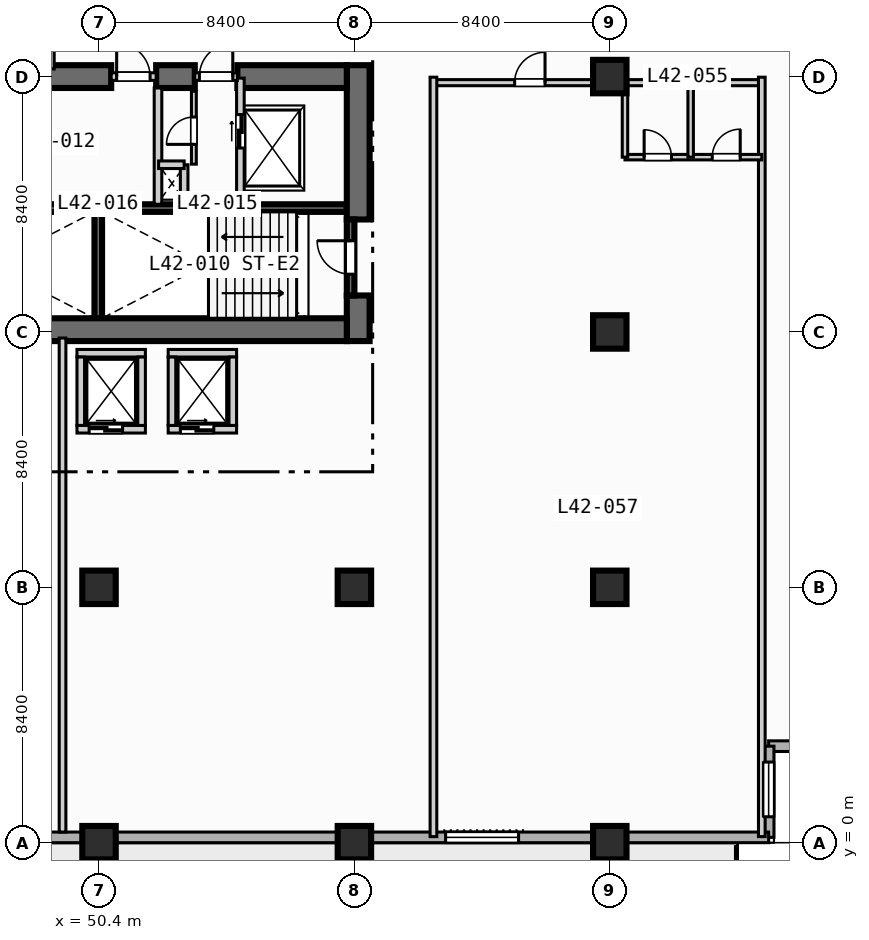
"""IFC4 building model, lengths in metres.
Left out: names, types, materials, properties, quantities, classifications, styles, units other than length and angle.
Written with IfcOpenShell. Run it as: python <this file> out.ifc"""

import sys

from ifc_helpers import new_model, si_unit, direction, frame, frame_2d, origin, origin_2d, place, context, subcontext, project, spatial, rectangle, extrude, element, fill, save


model = new_model("IFC4")
c1 = context("Model", 3, precision=1e-05, world=origin(), true_north=direction((0.0, 1.0)))
c2 = subcontext(c1, "Body", "Model", "MODEL_VIEW")
j1 = project(units=[si_unit("LENGTHUNIT", "METRE"), si_unit("PLANEANGLEUNIT", "RADIAN")], contexts=[c1])
p1 = place(None, origin())
s1 = spatial("IfcSite", under=j1, at=p1, CompositionType="ELEMENT")
p2 = place(p1, origin())
s2 = spatial("IfcBuilding", under=s1, at=p2, CompositionType="ELEMENT")
p3 = place(p2, frame((0.0, 0.0, 175.4)))
s3 = spatial("IfcBuildingStorey", under=s2, at=p3, CompositionType="ELEMENT", Elevation=175.4)
for number, where, z_axis, x_axis in (
    (1, (42.2, 20.875, 0.0), (0.0, 0.0, 1.0), (1.0, 0.0, 0.0)),
    (2, (50.5, 20.875, 0.0), (0.0, 0.0, 1.0), (1.0, 0.0, 0.0)),
):
    element("IfcWall", number, at=place(p3, frame(where, z_axis=z_axis, x_axis=x_axis)), inside=s3, PredefinedType="SOLIDWALL", context=c2, shape_type="SweptSolid", body=[
        extrude(rectangle(XDim=8.05, YDim=0.25, at=frame_2d((4.025, 0.0))), origin(), (0.0, 0.0, 1.0), 3.47),
    ])
p4 = place(p3, frame((50.375, 17.25, 0.0), z_axis=(0.0, 0.0, 1.0), x_axis=(0.0, 1.0, 0.0)))
e3 = element("IfcWall", 3, at=p4, inside=s3, PredefinedType="SOLIDWALL", context=c2, shape_type="SweptSolid", body=[
    extrude(rectangle(XDim=3.5, YDim=0.25, at=frame_2d((1.75, 0.0))), origin(), (0.0, 0.0, 1.0), 3.47),
])
p5 = place(p3, frame((58.925, 16.5, 0.0), z_axis=(0.0, 0.0, 1.0), x_axis=(0.0, 1.0, 0.0)))
e4 = element("IfcWall", 4, at=p5, inside=s3, PredefinedType="SHEAR", context=c2, shape_type="SweptSolid", body=[
    extrude(rectangle(XDim=1.5, YDim=0.75, at=frame_2d((0.75, 0.0))), origin(), (0.0, 0.0, 1.0), 3.47),
])
p6 = place(p3, frame((58.925, 20.5, 0.0), z_axis=(0.0, 0.0, 1.0), x_axis=(0.0, 1.0, 0.0)))
e5 = element("IfcWall", 5, at=p6, inside=s3, PredefinedType="SHEAR", context=c2, shape_type="SweptSolid", body=[
    extrude(rectangle(XDim=5.075, YDim=0.75, at=frame_2d((2.538, 0.0))), origin(), (0.0, 0.0, 1.0), 3.47),
])
p7 = place(p3, frame((42.2, 16.875, 0.0), z_axis=(0.0, 0.0, 1.0), x_axis=(1.0, 0.0, 0.0)))
e6 = element("IfcWall", 6, at=p7, inside=s3, PredefinedType="SHEAR", context=c2, shape_type="SweptSolid", body=[
    extrude(rectangle(XDim=16.35, YDim=0.75, at=frame_2d((8.175, 0.0))), origin(), (0.0, 0.0, 1.0), 3.47),
])
p8 = place(p3, frame((42.2, 25.2, 0.0), z_axis=(0.0, 0.0, 1.0), x_axis=(1.0, 0.0, 0.0)))
e7 = element("IfcWall", 7, at=p8, inside=s3, PredefinedType="SHEAR", context=c2, shape_type="SweptSolid", body=[
    extrude(rectangle(XDim=8.6, YDim=0.75, at=frame_2d((4.3, 0.0))), origin(), (0.0, 0.0, 1.0), 3.47),
])
p9 = place(p3, frame((52.28, 25.2, 0.0), z_axis=(0.0, 0.0, 1.0), x_axis=(1.0, 0.0, 0.0)))
e8 = element("IfcWall", 8, at=p9, inside=s3, PredefinedType="SHEAR", context=c2, shape_type="SweptSolid", body=[
    extrude(rectangle(XDim=1.27, YDim=0.75, at=frame_2d((0.635, 0.0))), origin(), (0.0, 0.0, 1.0), 3.47),
])
p10 = place(p3, frame((54.95, 25.2, 0.0), z_axis=(0.0, 0.0, 1.0), x_axis=(1.0, 0.0, 0.0)))
e9 = element("IfcWall", 9, at=p10, inside=s3, PredefinedType="SHEAR", context=c2, shape_type="SweptSolid", body=[
    extrude(rectangle(XDim=3.6, YDim=0.75, at=frame_2d((1.8, 0.0))), origin(), (0.0, 0.0, 1.0), 3.47),
])
for number, where, z_axis, x_axis in (
    (10, (50.4, 0.0, 0.0), (0.0, 0.0, 1.0), (1.0, 0.0, 0.0)),
    (11, (50.4, 8.4, 0.0), (0.0, 0.0, 1.0), (1.0, 0.0, 0.0)),
    (12, (58.8, 0.0, 0.0), (0.0, 0.0, 1.0), (1.0, 0.0, 0.0)),
    (13, (58.8, 8.4, 0.0), (0.0, 0.0, 1.0), (1.0, 0.0, 0.0)),
    (14, (67.2, 0.0, 0.0), (0.0, 0.0, 1.0), (1.0, 0.0, 0.0)),
    (15, (67.2, 8.4, 0.0), (0.0, 0.0, 1.0), (1.0, 0.0, 0.0)),
    (16, (67.2, 16.8, 0.0), (0.0, 0.0, 1.0), (1.0, 0.0, 0.0)),
    (17, (67.2, 25.2, 0.0), (0.0, 0.0, 1.0), (1.0, 0.0, 0.0)),
):
    element("IfcColumn", number, at=place(p3, frame(where, z_axis=z_axis, x_axis=x_axis)), inside=s3, PredefinedType="COLUMN", context=c2, shape_type="SweptSolid", body=[
        extrude(rectangle(XDim=1.1, YDim=1.1, at=origin_2d()), origin(), (0.0, 0.0, 1.0), 3.7),
    ])
p11 = place(p3, frame((75.425, 3.175, 0.0), z_axis=(0.0, 0.0, 1.0), x_axis=(-1.0, 0.0, 0.0)))
e18 = element("IfcWall", 18, at=p11, inside=s3, PredefinedType="STANDARD", context=c2, shape_type="SweptSolid", body=[
    extrude(rectangle(XDim=3.0, YDim=0.35, at=frame_2d((1.5, 0.0))), origin(), (0.0, 0.0, 1.0), 3.47),
])
p12 = place(p3, frame((72.425, 3.175, 0.0), z_axis=(0.0, 0.0, 1.0), x_axis=(0.0, -1.0, 0.0)))
e19 = element("IfcWall", 19, at=p12, inside=s3, PredefinedType="STANDARD", context=c2, shape_type="SweptSolid", body=[
    extrude(rectangle(XDim=3.0, YDim=0.35, at=frame_2d((1.5, 0.0))), origin(), (0.0, 0.0, 1.0), 3.47),
])
p13 = place(p12, frame((0.522, 0.0, 0.85)))
e20 = element("IfcOpeningElement", 20, at=p13, cuts=e19, PredefinedType="OPENING", context=c2, shape_type="SweptSolid", body=[
    extrude(rectangle(XDim=1.8, YDim=1.8, at=frame_2d((0.9, 0.9))), frame((0.0, 0.185, 0.0), z_axis=(0.0, -1.0, 0.0), x_axis=(1.0, 0.0, 0.0)), (0.0, 0.0, 1.0), 0.37),
])
p14 = place(p3, frame((72.425, 0.175, 0.0), z_axis=(0.0, 0.0, 1.0), x_axis=(-1.0, 0.0, 0.0)))
e21 = element("IfcWall", 21, at=p14, inside=s3, PredefinedType="STANDARD", context=c2, shape_type="SweptSolid", body=[
    extrude(rectangle(XDim=69.25, YDim=0.35, at=frame_2d((34.625, 0.0))), origin(), (0.0, 0.0, 1.0), 3.47),
])
p15 = place(p14, frame((51.725, 0.0, 0.0)))
e22 = element("IfcOpeningElement", 22, at=p15, cuts=e21, PredefinedType="OPENING", context=c2, shape_type="SweptSolid", body=[
    extrude(rectangle(XDim=1.4, YDim=2.2, at=frame_2d((0.7, 1.1))), frame((0.0, 0.185, 0.0), z_axis=(0.0, -1.0, 0.0), x_axis=(1.0, 0.0, 0.0)), (0.0, 0.0, 1.0), 0.37),
])
p16 = place(p14, frame((33.725, 0.0, 0.85)))
e23 = element("IfcOpeningElement", 23, at=p16, cuts=e21, PredefinedType="OPENING", context=c2, shape_type="SweptSolid", body=[
    extrude(rectangle(XDim=1.8, YDim=1.8, at=frame_2d((0.9, 0.9))), frame((0.0, 0.185, 0.0), z_axis=(0.0, -1.0, 0.0), x_axis=(1.0, 0.0, 0.0)), (0.0, 0.0, 1.0), 0.37),
])
p17 = place(p14, frame((25.025, 0.0, 0.85)))
e24 = element("IfcOpeningElement", 24, at=p17, cuts=e21, PredefinedType="OPENING", context=c2, shape_type="SweptSolid", body=[
    extrude(rectangle(XDim=2.4, YDim=1.95, at=frame_2d((1.2, 0.975))), frame((0.0, 0.185, 0.0), z_axis=(0.0, -1.0, 0.0), x_axis=(1.0, 0.0, 0.0)), (0.0, 0.0, 1.0), 0.37),
])
p18 = place(p14, frame((8.225, 0.0, 0.85)))
e25 = element("IfcOpeningElement", 25, at=p18, cuts=e21, PredefinedType="OPENING", context=c2, shape_type="SweptSolid", body=[
    extrude(rectangle(XDim=2.4, YDim=1.95, at=frame_2d((1.2, 0.975))), frame((0.0, 0.185, 0.0), z_axis=(0.0, -1.0, 0.0), x_axis=(1.0, 0.0, 0.0)), (0.0, 0.0, 1.0), 0.37),
])
p19 = place(p14, frame((64.725, 0.0, 0.85)))
e26 = element("IfcOpeningElement", 26, at=p19, cuts=e21, PredefinedType="OPENING", context=c2, shape_type="SweptSolid", body=[
    extrude(rectangle(XDim=1.8, YDim=1.8, at=frame_2d((0.9, 0.9))), frame((0.0, 0.185, 0.0), z_axis=(0.0, -1.0, 0.0), x_axis=(1.0, 0.0, 0.0)), (0.0, 0.0, 1.0), 0.37),
])
p20 = place(p14, frame((44.675, 0.0, 0.85)))
e27 = element("IfcOpeningElement", 27, at=p20, cuts=e21, PredefinedType="OPENING", context=c2, shape_type="SweptSolid", body=[
    extrude(rectangle(XDim=1.8, YDim=1.8, at=frame_2d((0.9, 0.9))), frame((0.0, 0.185, 0.0), z_axis=(0.0, -1.0, 0.0), x_axis=(1.0, 0.0, 0.0)), (0.0, 0.0, 1.0), 0.37),
])
p21 = place(p3, frame((58.675, 18.0, 0.0), z_axis=(0.0, 0.0, 1.0), x_axis=(0.0, 1.0, 0.0)))
e28 = element("IfcWall", 28, at=p21, inside=s3, PredefinedType="SOLIDWALL", context=c2, shape_type="SweptSolid", body=[
    extrude(rectangle(XDim=2.5, YDim=0.25, at=frame_2d((1.25, 0.0))), origin(), (0.0, 0.0, 1.0), 3.47),
])
p22 = place(p21, frame((0.7, 0.0, 0.0)))
e29 = element("IfcOpeningElement", 29, at=p22, cuts=e28, PredefinedType="OPENING", context=c2, shape_type="SweptSolid", body=[
    extrude(rectangle(XDim=1.1, YDim=2.15, at=frame_2d((0.55, 1.075))), frame((0.0, 0.135, 0.0), z_axis=(0.0, -1.0, 0.0), x_axis=(1.0, 0.0, 0.0)), (0.0, 0.0, 1.0), 0.27),
])
p23 = place(p3, frame((50.8, 25.2, 0.0), z_axis=(0.0, 0.0, 1.0), x_axis=(1.0, 0.0, 0.0)))
e30 = element("IfcWall", 30, at=p23, inside=s3, PredefinedType="SOLIDWALL", context=c2, shape_type="SweptSolid", body=[
    extrude(rectangle(XDim=1.48, YDim=0.25, at=frame_2d((0.74, 0.0))), origin(), (0.0, 0.0, 1.0), 3.47),
])
p24 = place(p23, frame((0.18, 0.0, 0.0)))
e31 = element("IfcOpeningElement", 31, at=p24, cuts=e30, PredefinedType="OPENING", context=c2, shape_type="SweptSolid", body=[
    extrude(rectangle(XDim=1.1, YDim=2.15, at=frame_2d((0.55, 1.075))), frame((0.0, 0.135, 0.0), z_axis=(0.0, -1.0, 0.0), x_axis=(1.0, 0.0, 0.0)), (0.0, 0.0, 1.0), 0.27),
])
p25 = place(p3, frame((52.34, 21.0, 0.0), z_axis=(0.0, 0.0, 1.0), x_axis=(0.0, 1.0, 0.0)))
e32 = element("IfcWall", 32, at=p25, inside=s3, PredefinedType="SOLIDWALL", context=c2, shape_type="SweptSolid", body=[
    extrude(rectangle(XDim=3.825, YDim=0.25, at=frame_2d((1.913, 0.0))), origin(), (0.0, 0.0, 1.0), 3.47),
])
p26 = place(p3, frame((55.05, 21.0, 0.0), z_axis=(0.0, 0.0, 1.0), x_axis=(0.0, 1.0, 0.0)))
e33 = element("IfcWall", 33, at=p26, inside=s3, PredefinedType="SOLIDWALL", context=c2, shape_type="SweptSolid", body=[
    extrude(rectangle(XDim=4.15, YDim=0.25, at=frame_2d((2.075, 0.0))), origin(), (0.0, 0.0, 1.0), 3.47),
])
p27 = place(p26, frame((1.85, 0.0, 0.0)))
e34 = element("IfcOpeningElement", 34, at=p27, cuts=e33, PredefinedType="OPENING", context=c2, shape_type="SweptSolid", body=[
    extrude(rectangle(XDim=1.1, YDim=2.15, at=frame_2d((0.55, 1.075))), frame((0.0, 0.135, 0.0), z_axis=(0.0, -1.0, 0.0), x_axis=(1.0, 0.0, 0.0)), (0.0, 0.0, 1.0), 0.27),
])
p28 = place(p3, frame((53.55, 25.2, 0.0), z_axis=(0.0, 0.0, 1.0), x_axis=(1.0, 0.0, 0.0)))
e35 = element("IfcWall", 35, at=p28, inside=s3, PredefinedType="SOLIDWALL", context=c2, shape_type="SweptSolid", body=[
    extrude(rectangle(XDim=1.4, YDim=0.25, at=frame_2d((0.7, 0.0))), origin(), (0.0, 0.0, 1.0), 3.47),
])
p29 = place(p28, frame((0.15, 0.0, 0.0)))
e36 = element("IfcOpeningElement", 36, at=p29, cuts=e35, PredefinedType="OPENING", context=c2, shape_type="SweptSolid", body=[
    extrude(rectangle(XDim=1.1, YDim=2.15, at=frame_2d((0.55, 1.075))), frame((0.0, 0.135, 0.0), z_axis=(0.0, -1.0, 0.0), x_axis=(1.0, 0.0, 0.0)), (0.0, 0.0, 1.0), 0.27),
])
p30 = place(p3, frame((53.2, 21.0, 0.0), z_axis=(0.0, 0.0, 1.0), x_axis=(0.0, 1.0, 0.0)))
e37 = element("IfcWall", 37, at=p30, inside=s3, PredefinedType="SOLIDWALL", context=c2, shape_type="SweptSolid", body=[
    extrude(rectangle(XDim=1.3, YDim=0.25, at=frame_2d((0.65, 0.0))), origin(), (0.0, 0.0, 1.0), 3.47),
])
p31 = place(p3, frame((52.36, 22.3, 0.0), z_axis=(0.0, 0.0, 1.0), x_axis=(1.0, 0.0, 0.0)))
e38 = element("IfcWall", 38, at=p31, inside=s3, PredefinedType="SOLIDWALL", context=c2, shape_type="SweptSolid", body=[
    extrude(rectangle(XDim=0.84, YDim=0.25, at=frame_2d((0.42, 0.0))), origin(), (0.0, 0.0, 1.0), 3.47),
])
p32 = place(p3, frame((53.52, 22.32, 0.0), z_axis=(0.0, 0.0, 1.0), x_axis=(0.0, 1.0, 0.0)))
e39 = element("IfcWall", 39, at=p32, inside=s3, PredefinedType="PARTITIONING", context=c2, shape_type="SweptSolid", body=[
    extrude(rectangle(XDim=2.4, YDim=0.16, at=frame_2d((1.2, 0.0))), origin(), (0.0, 0.0, 1.0), 3.47),
])
p33 = place(p32, frame((0.65, 0.0, 0.0)))
e40 = element("IfcOpeningElement", 40, at=p33, cuts=e39, PredefinedType="OPENING", context=c2, shape_type="SweptSolid", body=[
    extrude(rectangle(XDim=0.9, YDim=2.1, at=frame_2d((0.45, 1.05))), frame((0.0, 0.09, 0.0), z_axis=(0.0, -1.0, 0.0), x_axis=(1.0, 0.0, 0.0)), (0.0, 0.0, 1.0), 0.18),
])
p34 = place(p3, frame((49.675, 13.6, 0.0), z_axis=(0.0, 0.0, 1.0), x_axis=(1.0, 0.0, 0.0)))
e41 = element("IfcWall", 41, at=p34, inside=s3, PredefinedType="SOLIDWALL", context=c2, shape_type="SweptSolid", body=[
    extrude(rectangle(XDim=2.25, YDim=0.25, at=frame_2d((1.125, 0.0))), origin(), (0.0, 0.0, 1.0), 3.47),
])
p35 = place(p34, frame((0.4, 0.0, 0.0)))
e42 = element("IfcOpeningElement", 42, at=p35, cuts=e41, PredefinedType="OPENING", context=c2, shape_type="SweptSolid", body=[
    extrude(rectangle(XDim=1.1, YDim=2.15, at=frame_2d((0.55, 1.075))), frame((0.0, 0.135, 0.0), z_axis=(0.0, -1.0, 0.0), x_axis=(1.0, 0.0, 0.0)), (0.0, 0.0, 1.0), 0.27),
])
for number, where, z_axis, x_axis in (
    (43, (49.675, 16.1, 0.0), (0.0, 0.0, 1.0), (1.0, 0.0, 0.0)),
    (44, (49.8, 13.725, 0.0), (0.0, 0.0, 1.0), (0.0, 1.0, 0.0)),
    (45, (51.8, 13.725, 0.0), (0.0, 0.0, 1.0), (0.0, 1.0, 0.0)),
):
    element("IfcWall", number, at=place(p3, frame(where, z_axis=z_axis, x_axis=x_axis)), inside=s3, PredefinedType="SOLIDWALL", context=c2, shape_type="SweptSolid", body=[
        extrude(rectangle(XDim=2.25, YDim=0.25, at=frame_2d((1.125, 0.0))), origin(), (0.0, 0.0, 1.0), 3.47),
    ])
p36 = place(p3, frame((52.675, 13.6, 0.0), z_axis=(0.0, 0.0, 1.0), x_axis=(1.0, 0.0, 0.0)))
e46 = element("IfcWall", 46, at=p36, inside=s3, PredefinedType="SOLIDWALL", context=c2, shape_type="SweptSolid", body=[
    extrude(rectangle(XDim=2.25, YDim=0.25, at=frame_2d((1.125, 0.0))), origin(), (0.0, 0.0, 1.0), 3.47),
])
p37 = place(p36, frame((0.4, 0.0, 0.0)))
e47 = element("IfcOpeningElement", 47, at=p37, cuts=e46, PredefinedType="OPENING", context=c2, shape_type="SweptSolid", body=[
    extrude(rectangle(XDim=1.1, YDim=2.15, at=frame_2d((0.55, 1.075))), frame((0.0, 0.135, 0.0), z_axis=(0.0, -1.0, 0.0), x_axis=(1.0, 0.0, 0.0)), (0.0, 0.0, 1.0), 0.27),
])
for number, where, z_axis, x_axis in (
    (48, (52.675, 16.1, 0.0), (0.0, 0.0, 1.0), (1.0, 0.0, 0.0)),
    (49, (52.8, 13.725, 0.0), (0.0, 0.0, 1.0), (0.0, 1.0, 0.0)),
    (50, (54.8, 13.725, 0.0), (0.0, 0.0, 1.0), (0.0, 1.0, 0.0)),
):
    element("IfcWall", number, at=place(p3, frame(where, z_axis=z_axis, x_axis=x_axis)), inside=s3, PredefinedType="SOLIDWALL", context=c2, shape_type="SweptSolid", body=[
        extrude(rectangle(XDim=2.25, YDim=0.25, at=frame_2d((1.125, 0.0))), origin(), (0.0, 0.0, 1.0), 3.47),
    ])
p38 = place(p3, frame((48.8, 25.45, 0.0), z_axis=(0.0, 0.0, 1.0), x_axis=(0.0, 1.0, 0.0)))
e51 = element("IfcWall", 51, at=p38, inside=s3, PredefinedType="SOLIDWALL", context=c2, shape_type="SweptSolid", body=[
    extrude(rectangle(XDim=2.325, YDim=0.25, at=frame_2d((1.163, 0.0))), origin(), (0.0, 0.0, 1.0), 3.47),
])
p39 = place(p3, frame((49.2, 0.35, 0.0), z_axis=(0.0, 0.0, 1.0), x_axis=(0.0, 1.0, 0.0)))
e52 = element("IfcWall", 52, at=p39, inside=s3, PredefinedType="PARTITIONING", context=c2, shape_type="SweptSolid", body=[
    extrude(rectangle(XDim=16.25, YDim=0.22, at=frame_2d((8.125, 0.0))), origin(), (0.0, 0.0, 1.0), 3.47),
])
p40 = place(p3, frame((61.4, 25.0, 0.0), z_axis=(0.0, 0.0, 1.0), x_axis=(1.0, 0.0, 0.0)))
e53 = element("IfcWall", 53, at=p40, inside=s3, PredefinedType="PARTITIONING", context=c2, shape_type="SweptSolid", body=[
    extrude(rectangle(XDim=10.8, YDim=0.2, at=frame_2d((5.4, 0.0))), origin(), (0.0, 0.0, 1.0), 2.82),
])
p41 = place(p40, frame((2.67, 0.0, 0.0)))
e54 = element("IfcOpeningElement", 54, at=p41, cuts=e53, PredefinedType="OPENING", context=c2, shape_type="SweptSolid", body=[
    extrude(rectangle(XDim=1.0, YDim=2.15, at=frame_2d((0.5, 1.075))), frame((0.0, 0.11, 0.0), z_axis=(0.0, -1.0, 0.0), x_axis=(1.0, 0.0, 0.0)), (0.0, 0.0, 1.0), 0.22),
])
for number, where, z_axis, x_axis in (
    (55, (61.4, 0.2, 0.0), (0.0, 0.0, 1.0), (0.0, 1.0, 0.0)),
    (56, (72.2, 0.2, 0.0), (0.0, 0.0, 1.0), (0.0, 1.0, 0.0)),
):
    element("IfcWall", number, at=place(p3, frame(where, z_axis=z_axis, x_axis=x_axis)), inside=s3, PredefinedType="PARTITIONING", context=c2, shape_type="SweptSolid", body=[
        extrude(rectangle(XDim=24.98, YDim=0.22, at=frame_2d((12.49, 0.0))), origin(), (0.0, 0.0, 1.0), 3.47),
    ])
p42 = place(p3, frame((67.7, 22.55, 0.0), z_axis=(0.0, 0.0, 1.0), x_axis=(1.0, 0.0, 0.0)))
e57 = element("IfcWall", 57, at=p42, inside=s3, PredefinedType="PLUMBINGWALL", context=c2, shape_type="SweptSolid", body=[
    extrude(rectangle(XDim=4.5, YDim=0.18, at=frame_2d((2.25, 0.0))), origin(), (0.0, 0.0, 1.0), 3.47),
])
p43 = place(p42, frame((0.63, 0.0, 0.0)))
e58 = element("IfcOpeningElement", 58, at=p43, cuts=e57, PredefinedType="OPENING", context=c2, shape_type="SweptSolid", body=[
    extrude(rectangle(XDim=0.9, YDim=2.1, at=frame_2d((0.45, 1.05))), frame((0.0, 0.1, 0.0), z_axis=(0.0, -1.0, 0.0), x_axis=(1.0, 0.0, 0.0)), (0.0, 0.0, 1.0), 0.2),
])
p44 = place(p42, frame((2.87, 0.0, 0.0)))
e59 = element("IfcOpeningElement", 59, at=p44, cuts=e57, PredefinedType="OPENING", context=c2, shape_type="SweptSolid", body=[
    extrude(rectangle(XDim=0.92, YDim=2.1, at=frame_2d((0.46, 1.05))), frame((0.0, 0.1, 0.0), z_axis=(0.0, -1.0, 0.0), x_axis=(1.0, 0.0, 0.0)), (0.0, 0.0, 1.0), 0.2),
])
for number, where, z_axis, x_axis in (
    (60, (67.7, 22.55, 0.0), (0.0, 0.0, 1.0), (0.0, 1.0, 0.0)),
    (61, (69.86, 22.55, 0.0), (0.0, 0.0, 1.0), (0.0, 1.0, 0.0)),
):
    element("IfcWall", number, at=place(p3, frame(where, z_axis=z_axis, x_axis=x_axis)), inside=s3, PredefinedType="PLUMBINGWALL", context=c2, shape_type="SweptSolid", body=[
        extrude(rectangle(XDim=2.45, YDim=0.18, at=frame_2d((1.225, 0.0))), origin(), (0.0, 0.0, 1.0), 3.47),
    ])
p45 = place(p13, origin())
e62 = element("IfcWindow", 62, at=p45, inside=s3, PartitioningType="SINGLE_PANEL", PredefinedType="WINDOW", context=c2, shape_type="SweptSolid", body=[
    extrude(rectangle(XDim=1.8, YDim=1.8, at=frame_2d((0.9, 0.9))), frame((0.0, 0.03, 0.0), z_axis=(0.0, -1.0, 0.0), x_axis=(1.0, 0.0, 0.0)), (0.0, 0.0, 1.0), 0.06),
])
fill(e20, e62)
p46 = place(p18, origin())
e63 = element("IfcWindow", 63, at=p46, inside=s3, PartitioningType="SINGLE_PANEL", PredefinedType="WINDOW", context=c2, shape_type="SweptSolid", body=[
    extrude(rectangle(XDim=2.4, YDim=1.95, at=frame_2d((1.2, 0.975))), frame((0.0, 0.03, 0.0), z_axis=(0.0, -1.0, 0.0), x_axis=(1.0, 0.0, 0.0)), (0.0, 0.0, 1.0), 0.06),
])
fill(e25, e63)
p47 = place(p22, origin())
e64 = element("IfcDoor", 64, at=p47, inside=s3, OperationType="SINGLE_SWING_RIGHT", PredefinedType="DOOR", context=c2, shape_type="SweptSolid", body=[
    extrude(rectangle(XDim=1.1, YDim=2.15, at=frame_2d((0.55, 1.075))), frame((0.0, 0.025, 0.0), z_axis=(0.0, -1.0, 0.0), x_axis=(1.0, 0.0, 0.0)), (0.0, 0.0, 1.0), 0.05),
])
fill(e29, e64)
p48 = place(p24, origin())
e65 = element("IfcDoor", 65, at=p48, inside=s3, OperationType="SINGLE_SWING_LEFT", PredefinedType="DOOR", context=c2, shape_type="SweptSolid", body=[
    extrude(rectangle(XDim=1.1, YDim=2.15, at=frame_2d((0.55, 1.075))), frame((0.0, 0.025, 0.0), z_axis=(0.0, -1.0, 0.0), x_axis=(1.0, 0.0, 0.0)), (0.0, 0.0, 1.0), 0.05),
])
fill(e31, e65)
p49 = place(p27, origin())
e66 = element("IfcDoor", 66, at=p49, inside=s3, OperationType="SLIDING_TO_LEFT", PredefinedType="DOOR", context=c2, shape_type="SweptSolid", body=[
    extrude(rectangle(XDim=1.1, YDim=2.15, at=frame_2d((0.55, 1.075))), frame((0.0, 0.025, 0.0), z_axis=(0.0, -1.0, 0.0), x_axis=(1.0, 0.0, 0.0)), (0.0, 0.0, 1.0), 0.05),
])
fill(e34, e66)
p50 = place(p29, origin())
e67 = element("IfcDoor", 67, at=p50, inside=s3, OperationType="SINGLE_SWING_RIGHT", PredefinedType="DOOR", context=c2, shape_type="SweptSolid", body=[
    extrude(rectangle(XDim=1.1, YDim=2.15, at=frame_2d((0.55, 1.075))), frame((0.0, 0.025, 0.0), z_axis=(0.0, -1.0, 0.0), x_axis=(1.0, 0.0, 0.0)), (0.0, 0.0, 1.0), 0.05),
])
fill(e36, e67)
p51 = place(p33, origin())
e68 = element("IfcDoor", 68, at=p51, inside=s3, OperationType="SINGLE_SWING_LEFT", PredefinedType="DOOR", context=c2, shape_type="SweptSolid", body=[
    extrude(rectangle(XDim=0.9, YDim=2.1, at=frame_2d((0.45, 1.05))), frame((0.0, 0.025, 0.0), z_axis=(0.0, -1.0, 0.0), x_axis=(1.0, 0.0, 0.0)), (0.0, 0.0, 1.0), 0.05),
])
fill(e40, e68)
p52 = place(p35, origin())
e69 = element("IfcDoor", 69, at=p52, inside=s3, OperationType="SLIDING_TO_LEFT", PredefinedType="DOOR", context=c2, shape_type="SweptSolid", body=[
    extrude(rectangle(XDim=1.1, YDim=2.15, at=frame_2d((0.55, 1.075))), frame((0.0, 0.025, 0.0), z_axis=(0.0, -1.0, 0.0), x_axis=(1.0, 0.0, 0.0)), (0.0, 0.0, 1.0), 0.05),
])
fill(e42, e69)
p53 = place(p37, origin())
e70 = element("IfcDoor", 70, at=p53, inside=s3, OperationType="SLIDING_TO_LEFT", PredefinedType="DOOR", context=c2, shape_type="SweptSolid", body=[
    extrude(rectangle(XDim=1.1, YDim=2.15, at=frame_2d((0.55, 1.075))), frame((0.0, 0.025, 0.0), z_axis=(0.0, -1.0, 0.0), x_axis=(1.0, 0.0, 0.0)), (0.0, 0.0, 1.0), 0.05),
])
fill(e47, e70)
p54 = place(p41, origin())
e71 = element("IfcDoor", 71, at=p54, inside=s3, OperationType="SINGLE_SWING_RIGHT", PredefinedType="DOOR", context=c2, shape_type="SweptSolid", body=[
    extrude(rectangle(XDim=1.0, YDim=2.15, at=frame_2d((0.5, 1.075))), frame((0.0, 0.025, 0.0), z_axis=(0.0, -1.0, 0.0), x_axis=(1.0, 0.0, 0.0)), (0.0, 0.0, 1.0), 0.05),
])
fill(e54, e71)
p55 = place(p43, origin())
e72 = element("IfcDoor", 72, at=p55, inside=s3, OperationType="SINGLE_SWING_LEFT", PredefinedType="DOOR", context=c2, shape_type="SweptSolid", body=[
    extrude(rectangle(XDim=0.9, YDim=2.1, at=frame_2d((0.45, 1.05))), frame((0.0, 0.025, 0.0), z_axis=(0.0, -1.0, 0.0), x_axis=(1.0, 0.0, 0.0)), (0.0, 0.0, 1.0), 0.05),
])
fill(e58, e72)
p56 = place(p44, origin())
e73 = element("IfcDoor", 73, at=p56, inside=s3, OperationType="SINGLE_SWING_RIGHT", PredefinedType="DOOR", context=c2, shape_type="SweptSolid", body=[
    extrude(rectangle(XDim=0.92, YDim=2.1, at=frame_2d((0.46, 1.05))), frame((0.0, 0.025, 0.0), z_axis=(0.0, -1.0, 0.0), x_axis=(1.0, 0.0, 0.0)), (0.0, 0.0, 1.0), 0.05),
])
fill(e59, e73)
save(model, sys.argv[1])
